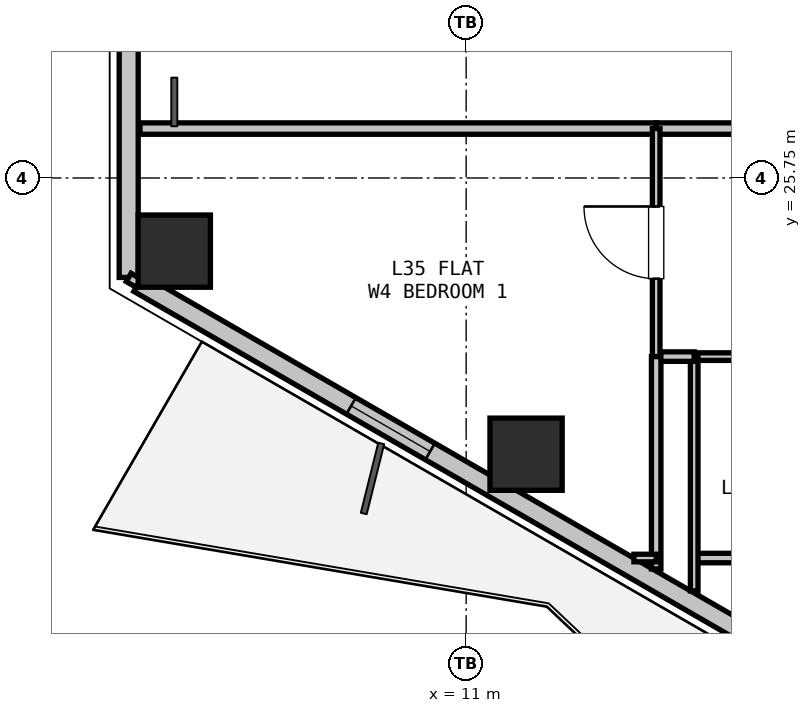
"""IFC4 building model, lengths in metres.
Left out: names, types, materials, properties, quantities, classifications, styles, units other than length and angle.
Written with IfcOpenShell. Run it as: python <this file> out.ifc"""

import sys

from ifc_helpers import new_model, si_unit, direction, frame, frame_2d, origin, origin_2d, place, context, subcontext, project, spatial, rectangle, hollow_rectangle, extrude, element, fill, save


model = new_model("IFC4")
c1 = context("Model", 3, precision=1e-05, world=origin(), true_north=direction((0.0, 1.0)))
c2 = subcontext(c1, "Body", "Model", "MODEL_VIEW")
j1 = project(units=[si_unit("LENGTHUNIT", "METRE"), si_unit("PLANEANGLEUNIT", "RADIAN")], contexts=[c1])
p1 = place(None, origin())
s1 = spatial("IfcSite", under=j1, at=p1, CompositionType="ELEMENT")
p2 = place(p1, origin())
s2 = spatial("IfcBuilding", under=s1, at=p2, CompositionType="ELEMENT")
p3 = place(p2, frame((0.0, 0.0, 127.8)))
s3 = spatial("IfcBuildingStorey", under=s2, at=p3, CompositionType="ELEMENT", Elevation=127.8)
for number, where, z_axis, x_axis in (
    (1, (11.788, 22.116, 0.0), (0.0, 0.0, 1.0), (1.0, 0.0, 0.0)),
    (2, (7.16, 24.788, 0.0), (0.0, 0.0, 1.0), (1.0, 0.0, 0.0)),
):
    element("IfcColumn", number, at=place(p3, frame(where, z_axis=z_axis, x_axis=x_axis)), inside=s3, PredefinedType="COLUMN", context=c2, shape_type="SweptSolid", body=[
        extrude(hollow_rectangle(XDim=0.95, YDim=0.95, WallThickness=0.028, at=origin_2d()), origin(), (0.0, 0.0, 1.0), 3.3),
    ])
p4 = place(p3, frame((6.56, 24.441, 0.0), z_axis=(0.0, 0.0, 1.0), x_axis=(0.0, 1.0, 0.0)))
e3 = element("IfcWall", 3, at=p4, inside=s3, PredefinedType="SOLIDWALL", context=c2, shape_type="SweptSolid", body=[
    extrude(rectangle(XDim=4.617, YDim=0.25, at=frame_2d((2.309, 0.0))), origin(), (0.0, 0.0, 1.0), 2.68),
])
p5 = place(p3, frame((16.378, 18.773, 0.0), z_axis=(0.0, 0.0, 1.0), x_axis=(-0.866027848477, 0.499995765644, 0.0)))
e4 = element("IfcWall", 4, at=p5, inside=s3, PredefinedType="SOLIDWALL", context=c2, shape_type="SweptSolid", body=[
    extrude(rectangle(XDim=11.186, YDim=0.25, at=frame_2d((5.593, 0.0))), origin(), (0.0, 0.0, 1.0), 2.68),
])
p6 = place(p5, frame((6.757, 0.0, 0.9)))
e5 = element("IfcOpeningElement", 5, at=p6, cuts=e4, PredefinedType="OPENING", context=c2, shape_type="SweptSolid", body=[
    extrude(rectangle(XDim=1.2, YDim=1.4, at=frame_2d((0.6, 0.7))), frame((0.0, 0.135, 0.0), z_axis=(0.0, -1.0, 0.0), x_axis=(1.0, 0.0, 0.0)), (0.0, 0.0, 1.0), 0.27),
])
p7 = place(p3, frame((14.0, 23.4, 0.0), z_axis=(0.0, 0.0, 1.0), x_axis=(1.0, 0.0, 0.0)))
e6 = element("IfcWall", 6, at=p7, inside=s3, PredefinedType="PARTITIONING", context=c2, shape_type="SweptSolid", body=[
    extrude(rectangle(XDim=3.0, YDim=0.1, at=frame_2d((1.5, 0.0))), origin(), (0.0, 0.0, 1.0), 3.06),
])
p8 = place(p7, frame((1.025, 0.0, 0.0)))
e7 = element("IfcOpeningElement", 7, at=p8, cuts=e6, PredefinedType="OPENING", context=c2, shape_type="SweptSolid", body=[
    extrude(rectangle(XDim=0.95, YDim=2.1, at=frame_2d((0.475, 1.05))), frame((0.0, 0.06, 0.0), z_axis=(0.0, -1.0, 0.0), x_axis=(1.0, 0.0, 0.0)), (0.0, 0.0, 1.0), 0.12),
])
p9 = place(p3, frame((17.0, 20.75, 0.0), z_axis=(0.0, 0.0, 1.0), x_axis=(-1.0, 0.0, 0.0)))
e8 = element("IfcWall", 8, at=p9, inside=s3, PredefinedType="PARTITIONING", context=c2, shape_type="SweptSolid", body=[
    extrude(rectangle(XDim=3.0, YDim=0.125, at=frame_2d((1.5, 0.0))), origin(), (0.0, 0.0, 1.0), 2.365),
])
p10 = place(p3, frame((14.0, 20.318, 0.0), z_axis=(0.0, 0.0, 1.0), x_axis=(0.0, 1.0, 0.0)))
e9 = element("IfcWall", 9, at=p10, inside=s3, PredefinedType="PARTITIONING", context=c2, shape_type="SweptSolid", body=[
    extrude(rectangle(XDim=3.082, YDim=0.1, at=frame_2d((1.541, 0.0))), origin(), (0.0, 0.0, 1.0), 2.365),
])
p11 = place(p3, frame((21.95, 26.4, 0.0), z_axis=(0.0, 0.0, 1.0), x_axis=(-1.0, 0.0, 0.0)))
e10 = element("IfcWall", 10, at=p11, inside=s3, PredefinedType="PARTITIONING", context=c2, shape_type="SweptSolid", body=[
    extrude(rectangle(XDim=8.45, YDim=0.15, at=frame_2d((4.225, 0.0))), origin(), (0.0, 0.0, 1.0), 2.508),
])
p12 = place(p3, frame((13.5, 26.4, 0.0), z_axis=(0.0, 0.0, 1.0), x_axis=(-1.0, 0.0, 0.0)))
e11 = element("IfcWall", 11, at=p12, inside=s3, PredefinedType="PARTITIONING", context=c2, shape_type="SweptSolid", body=[
    extrude(rectangle(XDim=6.791, YDim=0.15, at=frame_2d((3.396, 0.0))), origin(), (0.0, 0.0, 1.0), 2.724),
])
p13 = place(p3, frame((14.0, 23.4, 0.0), z_axis=(0.0, 0.0, 1.0), x_axis=(-1.0, 0.0, 0.0)))
e12 = element("IfcWall", 12, at=p13, inside=s3, PredefinedType="PARTITIONING", context=c2, shape_type="SweptSolid", body=[
    extrude(rectangle(XDim=0.5, YDim=0.125, at=frame_2d((0.25, 0.0))), origin(), (0.0, 0.0, 1.0), 3.06),
])
p14 = place(p3, frame((13.5, 23.4, 0.0), z_axis=(0.0, 0.0, 1.0), x_axis=(0.0, 1.0, 0.0)))
e13 = element("IfcWall", 13, at=p14, inside=s3, PredefinedType="PARTITIONING", context=c2, shape_type="SweptSolid", body=[
    extrude(rectangle(XDim=3.0, YDim=0.1, at=frame_2d((1.5, 0.0))), origin(), (0.0, 0.0, 1.0), 3.06),
])
p15 = place(p14, frame((1.025, 0.0, 0.0)))
e14 = element("IfcOpeningElement", 14, at=p15, cuts=e13, PredefinedType="OPENING", context=c2, shape_type="SweptSolid", body=[
    extrude(rectangle(XDim=0.95, YDim=2.1, at=frame_2d((0.475, 1.05))), frame((0.0, 0.06, 0.0), z_axis=(0.0, -1.0, 0.0), x_axis=(1.0, 0.0, 0.0)), (0.0, 0.0, 1.0), 0.12),
])
p16 = place(p3, frame((13.5, 23.4, 0.0), z_axis=(0.0, 0.0, 1.0), x_axis=(0.0, -1.0, 0.0)))
e15 = element("IfcWall", 15, at=p16, inside=s3, PredefinedType="PARTITIONING", context=c2, shape_type="SweptSolid", body=[
    extrude(rectangle(XDim=2.793, YDim=0.125, at=frame_2d((1.396, 0.0))), origin(), (0.0, 0.0, 1.0), 2.365),
])
p17 = place(p3, frame((13.5, 20.75, 0.0), z_axis=(0.0, 0.0, 1.0), x_axis=(-1.0, 0.0, 0.0)))
e16 = element("IfcWall", 16, at=p17, inside=s3, PredefinedType="PARTITIONING", context=c2, shape_type="SweptSolid", body=[
    extrude(rectangle(XDim=0.293, YDim=0.1, at=frame_2d((0.146, 0.0))), origin(), (0.0, 0.0, 1.0), 3.06),
])
p18 = place(p3, frame((6.69, 24.366, 0.0), z_axis=(0.0, 0.0, 1.0), x_axis=(-0.866131372301, 0.499816412211, 0.0)))
e17 = element("IfcWall", 17, at=p18, inside=s3, PredefinedType="PARTITIONING", context=c2, shape_type="SweptSolid", body=[
    extrude(rectangle(XDim=0.15, YDim=0.125, at=frame_2d((0.075, 0.0))), origin(), (0.0, 0.0, 1.0), 3.06),
])
p19 = place(p6, origin())
e18 = element("IfcWindow", 18, at=p19, inside=s3, PartitioningType="SINGLE_PANEL", PredefinedType="WINDOW", context=c2, shape_type="SweptSolid", body=[
    extrude(rectangle(XDim=1.2, YDim=1.4, at=frame_2d((0.6, 0.7))), frame((0.0, 0.03, 0.0), z_axis=(0.0, -1.0, 0.0), x_axis=(1.0, 0.0, 0.0)), (0.0, 0.0, 1.0), 0.06),
])
fill(e5, e18)
p20 = place(p15, origin())
e19 = element("IfcDoor", 19, at=p20, inside=s3, OperationType="SINGLE_SWING_RIGHT", PredefinedType="DOOR", context=c2, shape_type="SweptSolid", body=[
    extrude(rectangle(XDim=0.95, YDim=2.1, at=frame_2d((0.475, 1.05))), frame((0.0, 0.025, 0.0), z_axis=(0.0, -1.0, 0.0), x_axis=(1.0, 0.0, 0.0)), (0.0, 0.0, 1.0), 0.05),
])
fill(e14, e19)
save(model, sys.argv[1])
